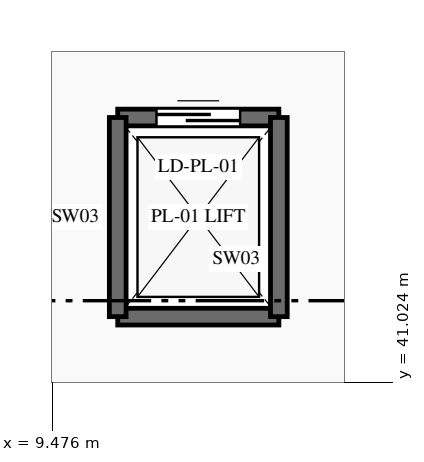
"""IFC4 building model, lengths in metres.
Left out: names, types, materials, properties, quantities, classifications, styles, units other than length and angle.
Written with IfcOpenShell. Run it as: python <this file> out.ifc"""

import sys

from ifc_helpers import new_model, si_unit, direction, frame, frame_2d, origin, place, context, subcontext, project, spatial, rectangle, extrude, element, fill, save


model = new_model("IFC4")
c1 = context("Model", 3, precision=1e-05, world=origin(), true_north=direction((0.0, 1.0)))
c2 = subcontext(c1, "Body", "Model", "MODEL_VIEW")
j1 = project(units=[si_unit("LENGTHUNIT", "METRE"), si_unit("PLANEANGLEUNIT", "RADIAN")], contexts=[c1])
p1 = place(None, origin())
s1 = spatial("IfcSite", under=j1, at=p1, CompositionType="ELEMENT")
p2 = place(p1, origin())
s2 = spatial("IfcBuilding", under=s1, at=p2, CompositionType="ELEMENT")
p3 = place(p2, frame((0.0, 0.0, 6.0)))
s3 = spatial("IfcBuildingStorey", under=s2, at=p3, CompositionType="ELEMENT", Elevation=6.0)
p4 = place(p3, frame((10.34, 41.89, 0.0), z_axis=(0.0, 0.0, 1.0), x_axis=(1.0, 0.0, 0.0)))
e1 = element("IfcWall", 1, at=p4, inside=s3, PredefinedType="SHEAR", context=c2, shape_type="SweptSolid", body=[
    extrude(rectangle(XDim=2.12, YDim=0.22, at=frame_2d((1.06, 0.0))), origin(), (0.0, 0.0, 1.0), 4.8),
])
p5 = place(p3, frame((10.34, 44.51, 0.0), z_axis=(0.0, 0.0, 1.0), x_axis=(1.0, 0.0, 0.0)))
e2 = element("IfcWall", 2, at=p5, inside=s3, PredefinedType="SHEAR", context=c2, shape_type="SweptSolid", body=[
    extrude(rectangle(XDim=2.12, YDim=0.22, at=frame_2d((1.06, 0.0))), origin(), (0.0, 0.0, 1.0), 4.8),
])
p6 = place(p5, frame((0.51, 0.0, 0.0)))
e3 = element("IfcOpeningElement", 3, at=p6, cuts=e2, PredefinedType="OPENING", context=c2, shape_type="SweptSolid", body=[
    extrude(rectangle(XDim=1.1, YDim=2.15, at=frame_2d((0.55, 1.075))), frame((0.0, 0.125, 0.0), z_axis=(0.0, -1.0, 0.0), x_axis=(1.0, 0.0, 0.0)), (0.0, 0.0, 1.0), 0.25),
])
for number, where, z_axis, x_axis in (
    (4, (10.34, 41.89, 0.0), (0.0, 0.0, 1.0), (0.0, 1.0, 0.0)),
    (5, (12.46, 41.89, 0.0), (0.0, 0.0, 1.0), (0.0, 1.0, 0.0)),
):
    element("IfcWall", number, at=place(p3, frame(where, z_axis=z_axis, x_axis=x_axis)), inside=s3, PredefinedType="SHEAR", context=c2, shape_type="SweptSolid", body=[
        extrude(rectangle(XDim=2.62, YDim=0.22, at=frame_2d((1.31, 0.0))), origin(), (0.0, 0.0, 1.0), 4.8),
    ])
p7 = place(p6, origin())
e6 = element("IfcDoor", 6, at=p7, inside=s3, OperationType="SLIDING_TO_RIGHT", PredefinedType="DOOR", context=c2, shape_type="SweptSolid", body=[
    extrude(rectangle(XDim=1.1, YDim=2.15, at=frame_2d((0.55, 1.075))), frame((0.0, 0.025, 0.0), z_axis=(0.0, -1.0, 0.0), x_axis=(1.0, 0.0, 0.0)), (0.0, 0.0, 1.0), 0.05),
])
fill(e3, e6)
save(model, sys.argv[1])
